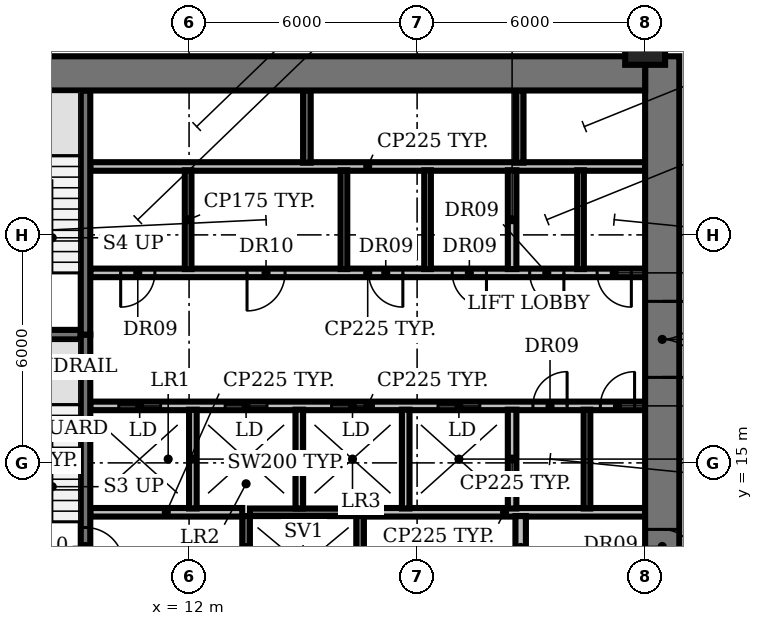
"""IFC4 building model, lengths in metres.
Left out: names, types, materials, properties, quantities, classifications, styles, units other than length and angle.
Written with IfcOpenShell. Run it as: python <this file> out.ifc"""

import sys

from ifc_helpers import new_model, si_unit, direction, frame, frame_2d, origin, origin_2d, place, context, subcontext, project, spatial, rectangle, circle, extrude, element, fill, save


model = new_model("IFC4")
c1 = context("Model", 3, precision=1e-05, world=origin(), true_north=direction((0.0, 1.0)))
c2 = subcontext(c1, "Body", "Model", "MODEL_VIEW")
j1 = project(units=[si_unit("LENGTHUNIT", "METRE"), si_unit("PLANEANGLEUNIT", "RADIAN")], contexts=[c1])
p1 = place(None, origin())
s1 = spatial("IfcSite", under=j1, at=p1, CompositionType="ELEMENT")
p2 = place(p1, origin())
s2 = spatial("IfcBuilding", under=s1, at=p2, CompositionType="ELEMENT")
p3 = place(p2, frame((0.0, 0.0, 62.6)))
s3 = spatial("IfcBuildingStorey", under=s2, at=p3, CompositionType="ELEMENT", Elevation=62.6)
p4 = place(p3, frame((24.0, 26.0, 0.0), z_axis=(0.0, 0.0, 1.0), x_axis=(1.0, 0.0, 0.0)))
e1 = element("IfcColumn", 1, at=p4, inside=s3, PredefinedType="COLUMN", context=c2, shape_type="SweptSolid", body=[
    extrude(circle(Radius=0.525, at=origin_2d()), origin(), (0.0, 0.0, 1.0), 3.85),
])
p5 = place(p3, frame((9.4, 13.7, 0.0), z_axis=(0.0, 0.0, 1.0), x_axis=(1.0, 0.0, 0.0)))
e2 = element("IfcWall", 2, at=p5, inside=s3, PredefinedType="PARTITIONING", context=c2, shape_type="SweptSolid", body=[
    extrude(rectangle(XDim=4.0, YDim=0.225, at=frame_2d((2.0, 0.0))), origin(), (0.0, 0.0, 1.0), 3.85),
])
p6 = place(p3, frame((13.6, 13.7, 0.0), z_axis=(0.0, 0.0, 1.0), x_axis=(1.0, 0.0, 0.0)))
e3 = element("IfcWall", 3, at=p6, inside=s3, PredefinedType="SHEAR", context=c2, shape_type="SweptSolid", body=[
    extrude(rectangle(XDim=2.8, YDim=0.2, at=frame_2d((1.4, 0.0))), origin(), (0.0, 0.0, 1.0), 3.85),
])
p7 = place(p3, frame((16.6, 13.7, 0.0), z_axis=(0.0, 0.0, 1.0), x_axis=(1.0, 0.0, 0.0)))
e4 = element("IfcWall", 4, at=p7, inside=s3, PredefinedType="PARTITIONING", context=c2, shape_type="SweptSolid", body=[
    extrude(rectangle(XDim=7.4, YDim=0.225, at=frame_2d((3.7, 0.0))), origin(), (0.0, 0.0, 1.0), 3.85),
])
p8 = place(p3, frame((9.4, 16.5, 0.0), z_axis=(0.0, 0.0, 1.0), x_axis=(1.0, 0.0, 0.0)))
e5 = element("IfcWall", 5, at=p8, inside=s3, PredefinedType="PARTITIONING", context=c2, shape_type="SweptSolid", body=[
    extrude(rectangle(XDim=14.6, YDim=0.225, at=frame_2d((7.3, 0.0))), origin(), (0.0, 0.0, 1.0), 3.85),
])
p9 = place(p8, frame((0.75, 0.0, 0.0)))
e6 = element("IfcOpeningElement", 6, at=p9, cuts=e5, PredefinedType="OPENING", context=c2, shape_type="SweptSolid", body=[
    extrude(rectangle(XDim=1.1, YDim=2.1, at=frame_2d((0.55, 1.05))), frame((0.0, 0.123, 0.0), z_axis=(0.0, -1.0, 0.0), x_axis=(1.0, 0.0, 0.0)), (0.0, 0.0, 1.0), 0.245),
])
p10 = place(p8, frame((3.55, 0.0, 0.0)))
e7 = element("IfcOpeningElement", 7, at=p10, cuts=e5, PredefinedType="OPENING", context=c2, shape_type="SweptSolid", body=[
    extrude(rectangle(XDim=1.1, YDim=2.1, at=frame_2d((0.55, 1.05))), frame((0.0, 0.123, 0.0), z_axis=(0.0, -1.0, 0.0), x_axis=(1.0, 0.0, 0.0)), (0.0, 0.0, 1.0), 0.245),
])
p11 = place(p8, frame((6.35, 0.0, 0.0)))
e8 = element("IfcOpeningElement", 8, at=p11, cuts=e5, PredefinedType="OPENING", context=c2, shape_type="SweptSolid", body=[
    extrude(rectangle(XDim=1.1, YDim=2.1, at=frame_2d((0.55, 1.05))), frame((0.0, 0.123, 0.0), z_axis=(0.0, -1.0, 0.0), x_axis=(1.0, 0.0, 0.0)), (0.0, 0.0, 1.0), 0.245),
])
p12 = place(p8, frame((9.15, 0.0, 0.0)))
e9 = element("IfcOpeningElement", 9, at=p12, cuts=e5, PredefinedType="OPENING", context=c2, shape_type="SweptSolid", body=[
    extrude(rectangle(XDim=1.1, YDim=2.1, at=frame_2d((0.55, 1.05))), frame((0.0, 0.123, 0.0), z_axis=(0.0, -1.0, 0.0), x_axis=(1.0, 0.0, 0.0)), (0.0, 0.0, 1.0), 0.245),
])
p13 = place(p8, frame((11.647, 0.0, 0.0)))
e10 = element("IfcOpeningElement", 10, at=p13, cuts=e5, PredefinedType="OPENING", context=c2, shape_type="SweptSolid", body=[
    extrude(rectangle(XDim=0.9, YDim=2.1, at=frame_2d((0.45, 1.05))), frame((0.0, 0.123, 0.0), z_axis=(0.0, -1.0, 0.0), x_axis=(1.0, 0.0, 0.0)), (0.0, 0.0, 1.0), 0.245),
])
p14 = place(p8, frame((13.423, 0.0, 0.0)))
e11 = element("IfcOpeningElement", 11, at=p14, cuts=e5, PredefinedType="OPENING", context=c2, shape_type="SweptSolid", body=[
    extrude(rectangle(XDim=0.9, YDim=2.1, at=frame_2d((0.45, 1.05))), frame((0.0, 0.123, 0.0), z_axis=(0.0, -1.0, 0.0), x_axis=(1.0, 0.0, 0.0)), (0.0, 0.0, 1.0), 0.245),
])
p15 = place(p3, frame((6.0, 18.375, 0.0), z_axis=(0.0, 0.0, 1.0), x_axis=(1.0, 0.0, 0.0)))
e12 = element("IfcWall", 12, at=p15, inside=s3, PredefinedType="SHEAR", context=c2, shape_type="SweptSolid", body=[
    extrude(rectangle(XDim=3.15, YDim=0.25, at=frame_2d((1.575, 0.0))), origin(), (0.0, 0.0, 1.0), 3.85),
])
p16 = place(p3, frame((24.0, 20.0, 0.0), z_axis=(0.0, 0.0, 1.0), x_axis=(-1.0, 0.0, 0.0)))
e13 = element("IfcWall", 13, at=p16, inside=s3, PredefinedType="PARTITIONING", context=c2, shape_type="SweptSolid", body=[
    extrude(rectangle(XDim=14.6, YDim=0.225, at=frame_2d((7.3, 0.0))), origin(), (0.0, 0.0, 1.0), 3.85),
])
p17 = place(p16, frame((12.9, 0.0, 0.0)))
e14 = element("IfcOpeningElement", 14, at=p17, cuts=e13, PredefinedType="OPENING", context=c2, shape_type="SweptSolid", body=[
    extrude(rectangle(XDim=0.9, YDim=2.1, at=frame_2d((0.45, 1.05))), frame((0.0, 0.123, 0.0), z_axis=(0.0, -1.0, 0.0), x_axis=(1.0, 0.0, 0.0)), (0.0, 0.0, 1.0), 0.245),
])
p18 = place(p16, frame((9.475, 0.0, 0.0)))
e15 = element("IfcOpeningElement", 15, at=p18, cuts=e13, PredefinedType="OPENING", context=c2, shape_type="SweptSolid", body=[
    extrude(rectangle(XDim=1.0, YDim=2.1, at=frame_2d((0.5, 1.05))), frame((0.0, 0.123, 0.0), z_axis=(0.0, -1.0, 0.0), x_axis=(1.0, 0.0, 0.0)), (0.0, 0.0, 1.0), 0.245),
])
p19 = place(p16, frame((6.375, 0.0, 0.0)))
e16 = element("IfcOpeningElement", 16, at=p19, cuts=e13, PredefinedType="OPENING", context=c2, shape_type="SweptSolid", body=[
    extrude(rectangle(XDim=0.9, YDim=2.1, at=frame_2d((0.45, 1.05))), frame((0.0, 0.123, 0.0), z_axis=(0.0, -1.0, 0.0), x_axis=(1.0, 0.0, 0.0)), (0.0, 0.0, 1.0), 0.245),
])
p20 = place(p16, frame((4.175, 0.0, 0.0)))
e17 = element("IfcOpeningElement", 17, at=p20, cuts=e13, PredefinedType="OPENING", context=c2, shape_type="SweptSolid", body=[
    extrude(rectangle(XDim=0.9, YDim=2.1, at=frame_2d((0.45, 1.05))), frame((0.0, 0.123, 0.0), z_axis=(0.0, -1.0, 0.0), x_axis=(1.0, 0.0, 0.0)), (0.0, 0.0, 1.0), 0.245),
])
p21 = place(p16, frame((2.137, 0.0, 0.0)))
e18 = element("IfcOpeningElement", 18, at=p21, cuts=e13, PredefinedType="OPENING", context=c2, shape_type="SweptSolid", body=[
    extrude(rectangle(XDim=0.9, YDim=2.1, at=frame_2d((0.45, 1.05))), frame((0.0, 0.123, 0.0), z_axis=(0.0, -1.0, 0.0), x_axis=(1.0, 0.0, 0.0)), (0.0, 0.0, 1.0), 0.245),
])
p22 = place(p16, frame((0.363, 0.0, 0.0)))
e19 = element("IfcOpeningElement", 19, at=p22, cuts=e13, PredefinedType="OPENING", context=c2, shape_type="SweptSolid", body=[
    extrude(rectangle(XDim=0.9, YDim=2.1, at=frame_2d((0.45, 1.05))), frame((0.0, 0.123, 0.0), z_axis=(0.0, -1.0, 0.0), x_axis=(1.0, 0.0, 0.0)), (0.0, 0.0, 1.0), 0.245),
])
p23 = place(p3, frame((9.4, 22.8, 0.0), z_axis=(0.0, 0.0, 1.0), x_axis=(1.0, 0.0, 0.0)))
e20 = element("IfcWall", 20, at=p23, inside=s3, PredefinedType="PARTITIONING", context=c2, shape_type="SweptSolid", body=[
    extrude(rectangle(XDim=14.6, YDim=0.225, at=frame_2d((7.3, 0.0))), origin(), (0.0, 0.0, 1.0), 3.85),
])
p24 = place(p3, frame((9.275, 18.375, 0.0), z_axis=(0.0, 0.0, 1.0), x_axis=(0.0, -1.0, 0.0)))
e21 = element("IfcWall", 21, at=p24, inside=s3, PredefinedType="SHEAR", context=c2, shape_type="SweptSolid", body=[
    extrude(rectangle(XDim=6.55, YDim=0.25, at=frame_2d((3.275, 0.0))), origin(), (0.0, 0.0, 1.0), 3.85),
])
p25 = place(p24, frame((5.075, 0.0, 0.0)))
e22 = element("IfcOpeningElement", 22, at=p25, cuts=e21, PredefinedType="OPENING", context=c2, shape_type="SweptSolid", body=[
    extrude(rectangle(XDim=1.0, YDim=2.1, at=frame_2d((0.5, 1.05))), frame((0.0, 0.135, 0.0), z_axis=(0.0, -1.0, 0.0), x_axis=(1.0, 0.0, 0.0)), (0.0, 0.0, 1.0), 0.27),
])
p26 = place(p3, frame((9.275, 18.375, 0.0), z_axis=(0.0, 0.0, 1.0), x_axis=(0.0, 1.0, 0.0)))
e23 = element("IfcWall", 23, at=p26, inside=s3, PredefinedType="SHEAR", context=c2, shape_type="SweptSolid", body=[
    extrude(rectangle(XDim=6.425, YDim=0.25, at=frame_2d((3.212, 0.0))), origin(), (0.0, 0.0, 1.0), 3.85),
])
p27 = place(p3, frame((11.975, 20.1, 0.0), z_axis=(0.0, 0.0, 1.0), x_axis=(0.0, 1.0, 0.0)))
e24 = element("IfcWall", 24, at=p27, inside=s3, PredefinedType="PARTITIONING", context=c2, shape_type="SweptSolid", body=[
    extrude(rectangle(XDim=2.6, YDim=0.175, at=frame_2d((1.3, 0.0))), origin(), (0.0, 0.0, 1.0), 3.85),
])
p28 = place(p3, frame((12.1, 13.8, 0.0), z_axis=(0.0, 0.0, 1.0), x_axis=(0.0, 1.0, 0.0)))
e25 = element("IfcWall", 25, at=p28, inside=s3, PredefinedType="SOLIDWALL", context=c2, shape_type="SweptSolid", body=[
    extrude(rectangle(XDim=2.6, YDim=0.2, at=frame_2d((1.3, 0.0))), origin(), (0.0, 0.0, 1.0), 3.85),
])
p29 = place(p3, frame((13.5, 5.4, 0.0), z_axis=(0.0, 0.0, 1.0), x_axis=(0.0, 1.0, 0.0)))
e26 = element("IfcWall", 26, at=p29, inside=s3, PredefinedType="SHEAR", context=c2, shape_type="SweptSolid", body=[
    extrude(rectangle(XDim=8.2, YDim=0.2, at=frame_2d((4.1, 0.0))), origin(), (0.0, 0.0, 1.0), 3.85),
])
p30 = place(p29, frame((0.75, 0.0, 0.0)))
e27 = element("IfcOpeningElement", 27, at=p30, cuts=e26, PredefinedType="OPENING", context=c2, shape_type="SweptSolid", body=[
    extrude(rectangle(XDim=1.1, YDim=2.1, at=frame_2d((0.55, 1.05))), frame((0.0, 0.11, 0.0), z_axis=(0.0, -1.0, 0.0), x_axis=(1.0, 0.0, 0.0)), (0.0, 0.0, 1.0), 0.22),
])
p31 = place(p29, frame((3.55, 0.0, 0.0)))
e28 = element("IfcOpeningElement", 28, at=p31, cuts=e26, PredefinedType="OPENING", context=c2, shape_type="SweptSolid", body=[
    extrude(rectangle(XDim=1.1, YDim=2.1, at=frame_2d((0.55, 1.05))), frame((0.0, 0.11, 0.0), z_axis=(0.0, -1.0, 0.0), x_axis=(1.0, 0.0, 0.0)), (0.0, 0.0, 1.0), 0.22),
])
p32 = place(p29, frame((6.35, 0.0, 0.0)))
e29 = element("IfcOpeningElement", 29, at=p32, cuts=e26, PredefinedType="OPENING", context=c2, shape_type="SweptSolid", body=[
    extrude(rectangle(XDim=1.1, YDim=2.1, at=frame_2d((0.55, 1.05))), frame((0.0, 0.11, 0.0), z_axis=(0.0, -1.0, 0.0), x_axis=(1.0, 0.0, 0.0)), (0.0, 0.0, 1.0), 0.22),
])
p33 = place(p3, frame((14.9, 13.8, 0.0), z_axis=(0.0, 0.0, 1.0), x_axis=(0.0, 1.0, 0.0)))
e30 = element("IfcWall", 30, at=p33, inside=s3, PredefinedType="SOLIDWALL", context=c2, shape_type="SweptSolid", body=[
    extrude(rectangle(XDim=2.6, YDim=0.2, at=frame_2d((1.3, 0.0))), origin(), (0.0, 0.0, 1.0), 3.85),
])
p34 = place(p3, frame((15.1, 22.9, 0.0), z_axis=(0.0, 0.0, 1.0), x_axis=(0.0, 1.0, 0.0)))
e31 = element("IfcWall", 31, at=p34, inside=s3, PredefinedType="SHEAR", context=c2, shape_type="SweptSolid", body=[
    extrude(rectangle(XDim=1.9, YDim=0.2, at=frame_2d((0.95, 0.0))), origin(), (0.0, 0.0, 1.0), 3.85),
])
p35 = place(p3, frame((16.075, 20.1, 0.0), z_axis=(0.0, 0.0, 1.0), x_axis=(0.0, 1.0, 0.0)))
e32 = element("IfcWall", 32, at=p35, inside=s3, PredefinedType="PARTITIONING", context=c2, shape_type="SweptSolid", body=[
    extrude(rectangle(XDim=2.6, YDim=0.175, at=frame_2d((1.3, 0.0))), origin(), (0.0, 0.0, 1.0), 3.85),
])
p36 = place(p3, frame((16.5, 5.4, 0.0), z_axis=(0.0, 0.0, 1.0), x_axis=(0.0, 1.0, 0.0)))
e33 = element("IfcWall", 33, at=p36, inside=s3, PredefinedType="SHEAR", context=c2, shape_type="SweptSolid", body=[
    extrude(rectangle(XDim=8.2, YDim=0.2, at=frame_2d((4.1, 0.0))), origin(), (0.0, 0.0, 1.0), 3.85),
])
p37 = place(p3, frame((17.7, 13.8, 0.0), z_axis=(0.0, 0.0, 1.0), x_axis=(0.0, 1.0, 0.0)))
e34 = element("IfcWall", 34, at=p37, inside=s3, PredefinedType="SOLIDWALL", context=c2, shape_type="SweptSolid", body=[
    extrude(rectangle(XDim=2.6, YDim=0.2, at=frame_2d((1.3, 0.0))), origin(), (0.0, 0.0, 1.0), 3.85),
])
p38 = place(p3, frame((18.275, 20.1, 0.0), z_axis=(0.0, 0.0, 1.0), x_axis=(0.0, 1.0, 0.0)))
e35 = element("IfcWall", 35, at=p38, inside=s3, PredefinedType="PARTITIONING", context=c2, shape_type="SweptSolid", body=[
    extrude(rectangle(XDim=2.6, YDim=0.175, at=frame_2d((1.3, 0.0))), origin(), (0.0, 0.0, 1.0), 3.85),
])
for number, where, z_axis, x_axis in (
    (36, (20.5, 13.8, 0.0), (0.0, 0.0, 1.0), (0.0, 1.0, 0.0)),
    (37, (20.5, 20.1, 0.0), (0.0, 0.0, 1.0), (0.0, 1.0, 0.0)),
):
    element("IfcWall", number, at=place(p3, frame(where, z_axis=z_axis, x_axis=x_axis)), inside=s3, PredefinedType="PARTITIONING", context=c2, shape_type="SweptSolid", body=[
        extrude(rectangle(XDim=2.6, YDim=0.225, at=frame_2d((1.3, 0.0))), origin(), (0.0, 0.0, 1.0), 3.85),
    ])
p39 = place(p3, frame((20.7, 22.9, 0.0), z_axis=(0.0, 0.0, 1.0), x_axis=(0.0, 1.0, 0.0)))
e38 = element("IfcWall", 38, at=p39, inside=s3, PredefinedType="SHEAR", context=c2, shape_type="SweptSolid", body=[
    extrude(rectangle(XDim=1.9, YDim=0.2, at=frame_2d((0.95, 0.0))), origin(), (0.0, 0.0, 1.0), 3.85),
])
p40 = place(p3, frame((20.725, 11.95, 0.0), z_axis=(0.0, 0.0, 1.0), x_axis=(0.0, 1.0, 0.0)))
e39 = element("IfcWall", 39, at=p40, inside=s3, PredefinedType="PARTITIONING", context=c2, shape_type="SweptSolid", body=[
    extrude(rectangle(XDim=1.65, YDim=0.275, at=frame_2d((0.825, 0.0))), origin(), (0.0, 0.0, 1.0), 3.85),
])
for number, where, z_axis, x_axis in (
    (40, (22.3, 20.1, 0.0), (0.0, 0.0, 1.0), (0.0, 1.0, 0.0)),
    (41, (22.47, 13.8, 0.0), (0.0, 0.0, 1.0), (0.0, 1.0, 0.0)),
):
    element("IfcWall", number, at=place(p3, frame(where, z_axis=z_axis, x_axis=x_axis)), inside=s3, PredefinedType="PARTITIONING", context=c2, shape_type="SweptSolid", body=[
        extrude(rectangle(XDim=2.6, YDim=0.175, at=frame_2d((1.3, 0.0))), origin(), (0.0, 0.0, 1.0), 3.85),
    ])
p41 = place(p3, frame((24.45, 25.7, 0.0), z_axis=(0.0, 0.0, 1.0), x_axis=(0.0, -1.0, 0.0)))
e42 = element("IfcWall", 42, at=p41, inside=s3, PredefinedType="SHEAR", context=c2, shape_type="SweptSolid", body=[
    extrude(rectangle(XDim=21.2, YDim=0.9, at=frame_2d((10.6, 0.0))), origin(), (0.0, 0.0, 1.0), 3.85),
])
p42 = place(p41, frame((18.55, 0.0, 0.0)))
e43 = element("IfcOpeningElement", 43, at=p42, cuts=e42, PredefinedType="OPENING", context=c2, shape_type="SweptSolid", body=[
    extrude(rectangle(XDim=1.5, YDim=2.1, at=frame_2d((0.75, 1.05))), frame((0.0, 0.46, 0.0), z_axis=(0.0, -1.0, 0.0), x_axis=(1.0, 0.0, 0.0)), (0.0, 0.0, 1.0), 0.92),
])
p43 = place(p41, frame((12.45, 0.0, 0.0)))
e44 = element("IfcOpeningElement", 44, at=p43, cuts=e42, PredefinedType="OPENING", context=c2, shape_type="SweptSolid", body=[
    extrude(rectangle(XDim=0.9, YDim=2.1, at=frame_2d((0.45, 1.05))), frame((0.0, 0.46, 0.0), z_axis=(0.0, -1.0, 0.0), x_axis=(1.0, 0.0, 0.0)), (0.0, 0.0, 1.0), 0.92),
])
p44 = place(p41, frame((6.45, 0.0, 0.0)))
e45 = element("IfcOpeningElement", 45, at=p44, cuts=e42, PredefinedType="OPENING", context=c2, shape_type="SweptSolid", body=[
    extrude(rectangle(XDim=2.0, YDim=2.1, at=frame_2d((1.0, 1.05))), frame((0.0, 0.46, 0.0), z_axis=(0.0, -1.0, 0.0), x_axis=(1.0, 0.0, 0.0)), (0.0, 0.0, 1.0), 0.92),
])
p45 = place(p3, frame((6.0, 25.25, 0.0), z_axis=(0.0, 0.0, 1.0), x_axis=(1.0, 0.0, 0.0)))
e46 = element("IfcWall", 46, at=p45, inside=s3, PredefinedType="SHEAR", context=c2, shape_type="SweptSolid", body=[
    extrude(rectangle(XDim=18.0, YDim=0.9, at=frame_2d((9.0, 0.0))), origin(), (0.0, 0.0, 1.0), 3.85),
])
p46 = place(p9, origin())
e47 = element("IfcDoor", 47, at=p46, inside=s3, OperationType="DOUBLE_DOOR_SLIDING", PredefinedType="DOOR", context=c2, shape_type="SweptSolid", body=[
    extrude(rectangle(XDim=1.1, YDim=2.1, at=frame_2d((0.55, 1.05))), frame((0.0, 0.025, 0.0), z_axis=(0.0, -1.0, 0.0), x_axis=(1.0, 0.0, 0.0)), (0.0, 0.0, 1.0), 0.05),
])
fill(e6, e47)
p47 = place(p10, origin())
e48 = element("IfcDoor", 48, at=p47, inside=s3, OperationType="DOUBLE_DOOR_SLIDING", PredefinedType="DOOR", context=c2, shape_type="SweptSolid", body=[
    extrude(rectangle(XDim=1.1, YDim=2.1, at=frame_2d((0.55, 1.05))), frame((0.0, 0.025, 0.0), z_axis=(0.0, -1.0, 0.0), x_axis=(1.0, 0.0, 0.0)), (0.0, 0.0, 1.0), 0.05),
])
fill(e7, e48)
p48 = place(p11, origin())
e49 = element("IfcDoor", 49, at=p48, inside=s3, OperationType="DOUBLE_DOOR_SLIDING", PredefinedType="DOOR", context=c2, shape_type="SweptSolid", body=[
    extrude(rectangle(XDim=1.1, YDim=2.1, at=frame_2d((0.55, 1.05))), frame((0.0, 0.025, 0.0), z_axis=(0.0, -1.0, 0.0), x_axis=(1.0, 0.0, 0.0)), (0.0, 0.0, 1.0), 0.05),
])
fill(e8, e49)
p49 = place(p12, origin())
e50 = element("IfcDoor", 50, at=p49, inside=s3, OperationType="DOUBLE_DOOR_SLIDING", PredefinedType="DOOR", context=c2, shape_type="SweptSolid", body=[
    extrude(rectangle(XDim=1.1, YDim=2.1, at=frame_2d((0.55, 1.05))), frame((0.0, 0.025, 0.0), z_axis=(0.0, -1.0, 0.0), x_axis=(1.0, 0.0, 0.0)), (0.0, 0.0, 1.0), 0.05),
])
fill(e9, e50)
p50 = place(p13, origin())
e51 = element("IfcDoor", 51, at=p50, inside=s3, OperationType="SINGLE_SWING_RIGHT", PredefinedType="DOOR", context=c2, shape_type="SweptSolid", body=[
    extrude(rectangle(XDim=0.9, YDim=2.1, at=frame_2d((0.45, 1.05))), frame((0.0, 0.025, 0.0), z_axis=(0.0, -1.0, 0.0), x_axis=(1.0, 0.0, 0.0)), (0.0, 0.0, 1.0), 0.05),
])
fill(e10, e51)
p51 = place(p14, origin())
e52 = element("IfcDoor", 52, at=p51, inside=s3, OperationType="SINGLE_SWING_RIGHT", PredefinedType="DOOR", context=c2, shape_type="SweptSolid", body=[
    extrude(rectangle(XDim=0.9, YDim=2.1, at=frame_2d((0.45, 1.05))), frame((0.0, 0.025, 0.0), z_axis=(0.0, -1.0, 0.0), x_axis=(1.0, 0.0, 0.0)), (0.0, 0.0, 1.0), 0.05),
])
fill(e11, e52)
p52 = place(p17, origin())
e53 = element("IfcDoor", 53, at=p52, inside=s3, OperationType="SINGLE_SWING_RIGHT", PredefinedType="DOOR", context=c2, shape_type="SweptSolid", body=[
    extrude(rectangle(XDim=0.9, YDim=2.1, at=frame_2d((0.45, 1.05))), frame((0.0, 0.025, 0.0), z_axis=(0.0, -1.0, 0.0), x_axis=(1.0, 0.0, 0.0)), (0.0, 0.0, 1.0), 0.05),
])
fill(e14, e53)
p53 = place(p18, origin())
e54 = element("IfcDoor", 54, at=p53, inside=s3, OperationType="SINGLE_SWING_RIGHT", PredefinedType="DOOR", context=c2, shape_type="SweptSolid", body=[
    extrude(rectangle(XDim=1.0, YDim=2.1, at=frame_2d((0.5, 1.05))), frame((0.0, 0.025, 0.0), z_axis=(0.0, -1.0, 0.0), x_axis=(1.0, 0.0, 0.0)), (0.0, 0.0, 1.0), 0.05),
])
fill(e15, e54)
p54 = place(p19, origin())
e55 = element("IfcDoor", 55, at=p54, inside=s3, OperationType="SINGLE_SWING_LEFT", PredefinedType="DOOR", context=c2, shape_type="SweptSolid", body=[
    extrude(rectangle(XDim=0.9, YDim=2.1, at=frame_2d((0.45, 1.05))), frame((0.0, 0.025, 0.0), z_axis=(0.0, -1.0, 0.0), x_axis=(1.0, 0.0, 0.0)), (0.0, 0.0, 1.0), 0.05),
])
fill(e16, e55)
p55 = place(p20, origin())
e56 = element("IfcDoor", 56, at=p55, inside=s3, OperationType="SINGLE_SWING_LEFT", PredefinedType="DOOR", context=c2, shape_type="SweptSolid", body=[
    extrude(rectangle(XDim=0.9, YDim=2.1, at=frame_2d((0.45, 1.05))), frame((0.0, 0.025, 0.0), z_axis=(0.0, -1.0, 0.0), x_axis=(1.0, 0.0, 0.0)), (0.0, 0.0, 1.0), 0.05),
])
fill(e17, e56)
p56 = place(p21, origin())
e57 = element("IfcDoor", 57, at=p56, inside=s3, OperationType="SINGLE_SWING_LEFT", PredefinedType="DOOR", context=c2, shape_type="SweptSolid", body=[
    extrude(rectangle(XDim=0.9, YDim=2.1, at=frame_2d((0.45, 1.05))), frame((0.0, 0.025, 0.0), z_axis=(0.0, -1.0, 0.0), x_axis=(1.0, 0.0, 0.0)), (0.0, 0.0, 1.0), 0.05),
])
fill(e18, e57)
p57 = place(p22, origin())
e58 = element("IfcDoor", 58, at=p57, inside=s3, OperationType="SINGLE_SWING_LEFT", PredefinedType="DOOR", context=c2, shape_type="SweptSolid", body=[
    extrude(rectangle(XDim=0.9, YDim=2.1, at=frame_2d((0.45, 1.05))), frame((0.0, 0.025, 0.0), z_axis=(0.0, -1.0, 0.0), x_axis=(1.0, 0.0, 0.0)), (0.0, 0.0, 1.0), 0.05),
])
fill(e19, e58)
p58 = place(p25, origin())
e59 = element("IfcDoor", 59, at=p58, inside=s3, OperationType="SINGLE_SWING_RIGHT", PredefinedType="DOOR", context=c2, shape_type="SweptSolid", body=[
    extrude(rectangle(XDim=1.0, YDim=2.1, at=frame_2d((0.5, 1.05))), frame((0.0, 0.025, 0.0), z_axis=(0.0, -1.0, 0.0), x_axis=(1.0, 0.0, 0.0)), (0.0, 0.0, 1.0), 0.05),
])
fill(e22, e59)
p59 = place(p32, origin())
e60 = element("IfcDoor", 60, at=p59, inside=s3, OperationType="DOUBLE_DOOR_SLIDING", PredefinedType="DOOR", context=c2, shape_type="SweptSolid", body=[
    extrude(rectangle(XDim=1.1, YDim=2.1, at=frame_2d((0.55, 1.05))), frame((0.0, 0.025, 0.0), z_axis=(0.0, -1.0, 0.0), x_axis=(1.0, 0.0, 0.0)), (0.0, 0.0, 1.0), 0.05),
])
fill(e29, e60)
p60 = place(p43, origin())
e61 = element("IfcDoor", 61, at=p60, inside=s3, OperationType="SINGLE_SWING_RIGHT", PredefinedType="DOOR", context=c2, shape_type="SweptSolid", body=[
    extrude(rectangle(XDim=0.9, YDim=2.1, at=frame_2d((0.45, 1.05))), frame((0.0, -0.39, 0.0), z_axis=(0.0, -1.0, 0.0), x_axis=(1.0, 0.0, 0.0)), (0.0, 0.0, 1.0), 0.05),
])
fill(e44, e61)
p61 = place(p44, origin())
e62 = element("IfcDoor", 62, at=p61, inside=s3, OperationType="DOUBLE_DOOR_SINGLE_SWING", PredefinedType="DOOR", context=c2, shape_type="SweptSolid", body=[
    extrude(rectangle(XDim=2.0, YDim=2.1, at=frame_2d((1.0, 1.05))), frame((0.0, 0.025, 0.0), z_axis=(0.0, -1.0, 0.0), x_axis=(1.0, 0.0, 0.0)), (0.0, 0.0, 1.0), 0.05),
])
fill(e45, e62)
save(model, sys.argv[1])
